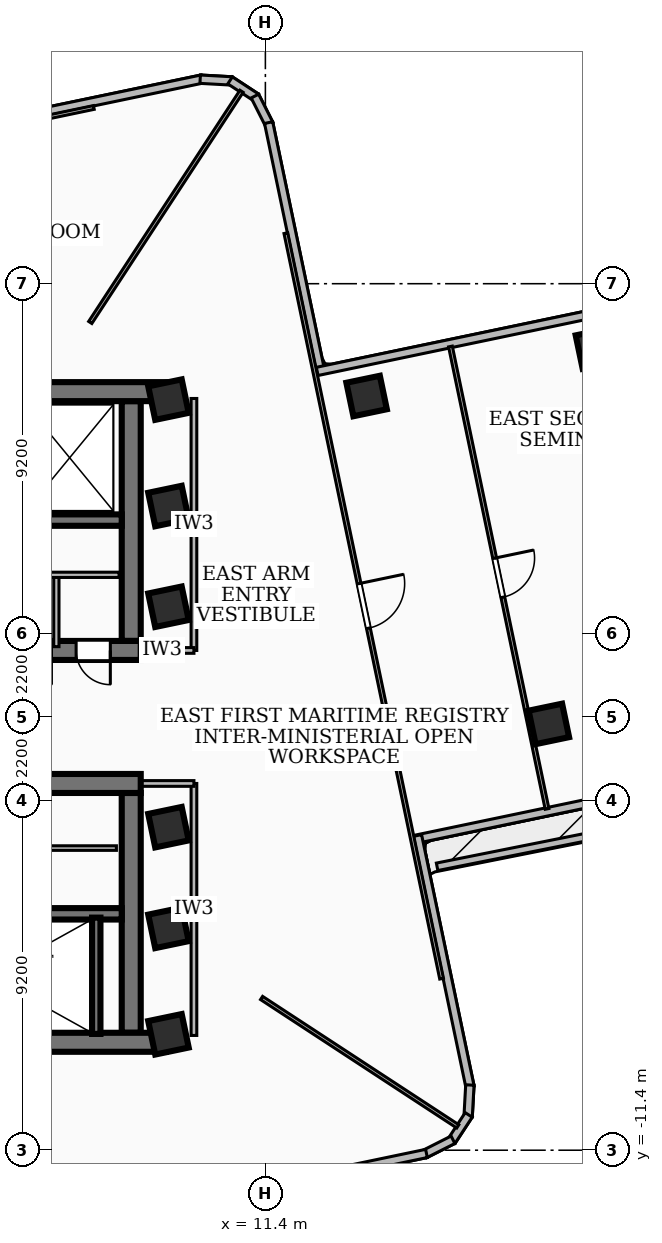
"""IFC4 building model, lengths in metres.
Left out: names, types, materials, properties, quantities, classifications, styles, units other than length and angle.
Written with IfcOpenShell. Run it as: python <this file> out.ifc"""

import sys

from ifc_helpers import new_model, si_unit, direction, frame, frame_2d, origin, origin_2d, place, context, subcontext, project, spatial, rectangle, extrude, element, fill, save


model = new_model("IFC4")
c1 = context("Model", 3, precision=1e-05, world=origin(), true_north=direction((0.0, 1.0)))
c2 = subcontext(c1, "Body", "Model", "MODEL_VIEW")
j1 = project(units=[si_unit("LENGTHUNIT", "METRE"), si_unit("PLANEANGLEUNIT", "RADIAN")], contexts=[c1])
p1 = place(None, origin())
s1 = spatial("IfcSite", under=j1, at=p1, CompositionType="ELEMENT")
p2 = place(p1, origin())
s2 = spatial("IfcBuilding", under=s1, at=p2, CompositionType="ELEMENT")
p3 = place(p2, frame((0.0, 0.0, 111.96)))
s3 = spatial("IfcBuildingStorey", under=s2, at=p3, CompositionType="ELEMENT", Elevation=111.96)
p4 = place(p3, frame((-8.78, 8.56, 0.0), z_axis=(0.0, 0.0, 1.0), x_axis=(1.0, 0.0, 0.0)))
e1 = element("IfcWall", 1, at=p4, inside=s3, PredefinedType="SHEAR", context=c2, shape_type="SweptSolid", body=[
    extrude(rectangle(XDim=17.56, YDim=0.5, at=frame_2d((8.78, 0.0))), origin(), (0.0, 0.0, 1.0), 4.06),
])
p5 = place(p3, frame((8.12, 1.75, 0.0), z_axis=(0.0, 0.0, 1.0), x_axis=(-1.0, 0.0, 0.0)))
e2 = element("IfcWall", 2, at=p5, inside=s3, PredefinedType="SHEAR", context=c2, shape_type="SweptSolid", body=[
    extrude(rectangle(XDim=16.24, YDim=0.5, at=frame_2d((8.12, 0.0))), origin(), (0.0, 0.0, 1.0), 4.06),
])
p6 = place(p5, frame((7.45, 0.0, 0.0)))
e3 = element("IfcOpeningElement", 3, at=p6, cuts=e2, PredefinedType="OPENING", context=c2, shape_type="SweptSolid", body=[
    extrude(rectangle(XDim=1.0, YDim=2.1, at=frame_2d((0.5, 1.05))), frame((0.0, 0.26, 0.0), z_axis=(0.0, -1.0, 0.0), x_axis=(1.0, 0.0, 0.0)), (0.0, 0.0, 1.0), 0.52),
])
p7 = place(p5, frame((14.285, 0.0, 0.0)))
e4 = element("IfcOpeningElement", 4, at=p7, cuts=e2, PredefinedType="OPENING", context=c2, shape_type="SweptSolid", body=[
    extrude(rectangle(XDim=1.05, YDim=2.15, at=frame_2d((0.525, 1.075))), frame((0.0, 0.26, 0.0), z_axis=(0.0, -1.0, 0.0), x_axis=(1.0, 0.0, 0.0)), (0.0, 0.0, 1.0), 0.52),
])
p8 = place(p5, frame((12.725, 0.0, 0.0)))
e5 = element("IfcOpeningElement", 5, at=p8, cuts=e2, PredefinedType="OPENING", context=c2, shape_type="SweptSolid", body=[
    extrude(rectangle(XDim=1.05, YDim=2.15, at=frame_2d((0.525, 1.075))), frame((0.0, 0.26, 0.0), z_axis=(0.0, -1.0, 0.0), x_axis=(1.0, 0.0, 0.0)), (0.0, 0.0, 1.0), 0.52),
])
p9 = place(p5, frame((11.165, 0.0, 0.0)))
e6 = element("IfcOpeningElement", 6, at=p9, cuts=e2, PredefinedType="OPENING", context=c2, shape_type="SweptSolid", body=[
    extrude(rectangle(XDim=1.05, YDim=2.15, at=frame_2d((0.525, 1.075))), frame((0.0, 0.26, 0.0), z_axis=(0.0, -1.0, 0.0), x_axis=(1.0, 0.0, 0.0)), (0.0, 0.0, 1.0), 0.52),
])
p10 = place(p5, frame((3.85, 0.0, 0.0)))
e7 = element("IfcOpeningElement", 7, at=p10, cuts=e2, PredefinedType="OPENING", context=c2, shape_type="SweptSolid", body=[
    extrude(rectangle(XDim=0.9, YDim=2.06, at=frame_2d((0.45, 1.03))), frame((0.0, 0.26, 0.0), z_axis=(0.0, -1.0, 0.0), x_axis=(1.0, 0.0, 0.0)), (0.0, 0.0, 1.0), 0.52),
])
p11 = place(p5, frame((2.35, 0.0, 0.0)))
e8 = element("IfcOpeningElement", 8, at=p11, cuts=e2, PredefinedType="OPENING", context=c2, shape_type="SweptSolid", body=[
    extrude(rectangle(XDim=0.9, YDim=2.06, at=frame_2d((0.45, 1.03))), frame((0.0, 0.26, 0.0), z_axis=(0.0, -1.0, 0.0), x_axis=(1.0, 0.0, 0.0)), (0.0, 0.0, 1.0), 0.52),
])
p12 = place(p5, frame((0.8, 0.0, 0.0)))
e9 = element("IfcOpeningElement", 9, at=p12, cuts=e2, PredefinedType="OPENING", context=c2, shape_type="SweptSolid", body=[
    extrude(rectangle(XDim=0.9, YDim=2.06, at=frame_2d((0.45, 1.03))), frame((0.0, 0.26, 0.0), z_axis=(0.0, -1.0, 0.0), x_axis=(1.0, 0.0, 0.0)), (0.0, 0.0, 1.0), 0.52),
])
p13 = place(p3, frame((7.87, 8.31, 0.0), z_axis=(0.0, 0.0, 1.0), x_axis=(0.0, -1.0, 0.0)))
e10 = element("IfcWall", 10, at=p13, inside=s3, PredefinedType="SHEAR", context=c2, shape_type="SweptSolid", body=[
    extrude(rectangle(XDim=6.31, YDim=0.5, at=frame_2d((3.155, 0.0))), origin(), (0.0, 0.0, 1.0), 4.06),
])
p14 = place(p3, frame((7.62, 5.18, 0.0), z_axis=(0.0, 0.0, 1.0), x_axis=(-1.0, 0.0, 0.0)))
e11 = element("IfcWall", 11, at=p14, inside=s3, PredefinedType="SOLIDWALL", context=c2, shape_type="SweptSolid", body=[
    extrude(rectangle(XDim=15.24, YDim=0.3, at=frame_2d((7.62, 0.0))), origin(), (0.0, 0.0, 1.0), 4.06),
])
p15 = place(p14, frame((5.77, 0.0, 0.0)))
e12 = element("IfcOpeningElement", 12, at=p15, cuts=e11, PredefinedType="OPENING", context=c2, shape_type="SweptSolid", body=[
    extrude(rectangle(XDim=1.1, YDim=2.15, at=frame_2d((0.55, 1.075))), frame((0.0, 0.16, 0.0), z_axis=(0.0, -1.0, 0.0), x_axis=(1.0, 0.0, 0.0)), (0.0, 0.0, 1.0), 0.32),
])
p16 = place(p14, frame((2.97, 0.0, 0.0)))
e13 = element("IfcOpeningElement", 13, at=p16, cuts=e11, PredefinedType="OPENING", context=c2, shape_type="SweptSolid", body=[
    extrude(rectangle(XDim=1.1, YDim=2.15, at=frame_2d((0.55, 1.075))), frame((0.0, 0.16, 0.0), z_axis=(0.0, -1.0, 0.0), x_axis=(1.0, 0.0, 0.0)), (0.0, 0.0, 1.0), 0.32),
])
p17 = place(p14, frame((7.97, 0.0, 0.0)))
e14 = element("IfcOpeningElement", 14, at=p17, cuts=e11, PredefinedType="OPENING", context=c2, shape_type="SweptSolid", body=[
    extrude(rectangle(XDim=1.0, YDim=2.1, at=frame_2d((0.5, 1.05))), frame((0.0, 0.16, 0.0), z_axis=(0.0, -1.0, 0.0), x_axis=(1.0, 0.0, 0.0)), (0.0, 0.0, 1.0), 0.32),
])
p18 = place(p3, frame((8.78, -8.56, 0.0), z_axis=(0.0, 0.0, 1.0), x_axis=(-1.0, 0.0, 0.0)))
e15 = element("IfcWall", 15, at=p18, inside=s3, PredefinedType="SHEAR", context=c2, shape_type="SweptSolid", body=[
    extrude(rectangle(XDim=17.56, YDim=0.5, at=frame_2d((8.78, 0.0))), origin(), (0.0, 0.0, 1.0), 4.06),
])
p19 = place(p3, frame((-8.12, -1.75, 0.0), z_axis=(0.0, 0.0, 1.0), x_axis=(1.0, 0.0, 0.0)))
e16 = element("IfcWall", 16, at=p19, inside=s3, PredefinedType="SHEAR", context=c2, shape_type="SweptSolid", body=[
    extrude(rectangle(XDim=16.24, YDim=0.5, at=frame_2d((8.12, 0.0))), origin(), (0.0, 0.0, 1.0), 4.06),
])
p20 = place(p19, frame((7.45, 0.0, 0.0)))
e17 = element("IfcOpeningElement", 17, at=p20, cuts=e16, PredefinedType="OPENING", context=c2, shape_type="SweptSolid", body=[
    extrude(rectangle(XDim=1.0, YDim=2.1, at=frame_2d((0.5, 1.05))), frame((0.0, 0.26, 0.0), z_axis=(0.0, -1.0, 0.0), x_axis=(1.0, 0.0, 0.0)), (0.0, 0.0, 1.0), 0.52),
])
p21 = place(p19, frame((12.65, 0.0, 0.0)))
e18 = element("IfcOpeningElement", 18, at=p21, cuts=e16, PredefinedType="OPENING", context=c2, shape_type="SweptSolid", body=[
    extrude(rectangle(XDim=0.9, YDim=2.06, at=frame_2d((0.45, 1.03))), frame((0.0, 0.26, 0.0), z_axis=(0.0, -1.0, 0.0), x_axis=(1.0, 0.0, 0.0)), (0.0, 0.0, 1.0), 0.52),
])
p22 = place(p19, frame((0.565, 0.0, 0.0)))
e19 = element("IfcOpeningElement", 19, at=p22, cuts=e16, PredefinedType="OPENING", context=c2, shape_type="SweptSolid", body=[
    extrude(rectangle(XDim=1.05, YDim=2.15, at=frame_2d((0.525, 1.075))), frame((0.0, 0.26, 0.0), z_axis=(0.0, -1.0, 0.0), x_axis=(1.0, 0.0, 0.0)), (0.0, 0.0, 1.0), 0.52),
])
p23 = place(p19, frame((2.125, 0.0, 0.0)))
e20 = element("IfcOpeningElement", 20, at=p23, cuts=e16, PredefinedType="OPENING", context=c2, shape_type="SweptSolid", body=[
    extrude(rectangle(XDim=1.05, YDim=2.15, at=frame_2d((0.525, 1.075))), frame((0.0, 0.26, 0.0), z_axis=(0.0, -1.0, 0.0), x_axis=(1.0, 0.0, 0.0)), (0.0, 0.0, 1.0), 0.52),
])
p24 = place(p19, frame((3.685, 0.0, 0.0)))
e21 = element("IfcOpeningElement", 21, at=p24, cuts=e16, PredefinedType="OPENING", context=c2, shape_type="SweptSolid", body=[
    extrude(rectangle(XDim=1.05, YDim=2.15, at=frame_2d((0.525, 1.075))), frame((0.0, 0.26, 0.0), z_axis=(0.0, -1.0, 0.0), x_axis=(1.0, 0.0, 0.0)), (0.0, 0.0, 1.0), 0.52),
])
p25 = place(p3, frame((7.87, -2.0, 0.0), z_axis=(0.0, 0.0, 1.0), x_axis=(0.0, -1.0, 0.0)))
e22 = element("IfcWall", 22, at=p25, inside=s3, PredefinedType="SHEAR", context=c2, shape_type="SweptSolid", body=[
    extrude(rectangle(XDim=6.31, YDim=0.5, at=frame_2d((3.155, 0.0))), origin(), (0.0, 0.0, 1.0), 4.06),
])
p26 = place(p3, frame((-7.62, -5.18, 0.0), z_axis=(0.0, 0.0, 1.0), x_axis=(1.0, 0.0, 0.0)))
e23 = element("IfcWall", 23, at=p26, inside=s3, PredefinedType="SOLIDWALL", context=c2, shape_type="SweptSolid", body=[
    extrude(rectangle(XDim=15.24, YDim=0.3, at=frame_2d((7.62, 0.0))), origin(), (0.0, 0.0, 1.0), 4.06),
])
p27 = place(p26, frame((5.77, 0.0, 0.0)))
e24 = element("IfcOpeningElement", 24, at=p27, cuts=e23, PredefinedType="OPENING", context=c2, shape_type="SweptSolid", body=[
    extrude(rectangle(XDim=1.1, YDim=2.15, at=frame_2d((0.55, 1.075))), frame((0.0, 0.16, 0.0), z_axis=(0.0, -1.0, 0.0), x_axis=(1.0, 0.0, 0.0)), (0.0, 0.0, 1.0), 0.32),
])
p28 = place(p26, frame((7.97, 0.0, 0.0)))
e25 = element("IfcOpeningElement", 25, at=p28, cuts=e23, PredefinedType="OPENING", context=c2, shape_type="SweptSolid", body=[
    extrude(rectangle(XDim=1.0, YDim=2.1, at=frame_2d((0.5, 1.05))), frame((0.0, 0.16, 0.0), z_axis=(0.0, -1.0, 0.0), x_axis=(1.0, 0.0, 0.0)), (0.0, 0.0, 1.0), 0.32),
])
p29 = place(p3, frame((6.95, -8.34, 0.0), z_axis=(0.0, 0.0, 1.0), x_axis=(0.0, 1.0, 0.0)))
e26 = element("IfcWall", 26, at=p29, inside=s3, PredefinedType="SOLIDWALL", context=c2, shape_type="SweptSolid", body=[
    extrude(rectangle(XDim=3.06, YDim=0.22, at=frame_2d((1.53, 0.0))), origin(), (0.0, 0.0, 1.0), 4.06),
])
for number, where, z_axis, x_axis in (
    (27, (8.85, -5.55, 0.0), (0.0, 0.0, 1.0), (0.979, 0.204, 0.0)),
    (28, (8.85, -2.9, 0.0), (0.0, 0.0, 1.0), (0.979, 0.204, 0.0)),
    (29, (8.85, 2.9, 0.0), (0.0, 0.0, 1.0), (0.979, 0.204, 0.0)),
    (30, (8.85, 5.55, 0.0), (0.0, 0.0, 1.0), (0.979, 0.204, 0.0)),
    (31, (8.85, -8.35, 0.0), (0.0, 0.0, 1.0), (0.979, 0.204, 0.0)),
    (32, (8.85, 8.35, 0.0), (0.0, 0.0, 1.0), (0.979, 0.204, 0.0)),
    (33, (18.86, -0.183, 0.0), (0.0, 0.0, 1.0), (0.979, 0.204, 0.0)),
    (34, (14.064, 8.445, 0.0), (0.0, 0.0, 1.0), (0.979, 0.204, 0.0)),
    (35, (20.098, 9.692, 0.0), (0.0, 0.0, 1.0), (0.979, 0.204, 0.0)),
):
    element("IfcColumn", number, at=place(p3, frame(where, z_axis=z_axis, x_axis=x_axis)), inside=s3, PredefinedType="COLUMN", context=c2, shape_type="SweptSolid", body=[
        extrude(rectangle(XDim=0.9, YDim=0.9, at=origin_2d()), origin(), (0.0, 0.0, 1.0), 4.32),
    ])
p30 = place(p3, frame((3.119, 15.403, 0.0), z_axis=(0.0, 0.0, 1.0), x_axis=(0.978864530031, 0.204509735336, 0.0)))
e36 = element("IfcWall", 36, at=p30, inside=s3, PredefinedType="SOLIDWALL", context=c2, shape_type="SweptSolid", body=[
    extrude(rectangle(XDim=6.757, YDim=0.22, at=frame_2d((3.378, 0.0))), origin(), (0.0, 0.0, 1.0), 3.29),
])
p31 = place(p3, frame((9.684, 16.781, 0.0), z_axis=(0.0, 0.0, 1.0), x_axis=(0.998485462078, -0.055016197793, 0.0)))
e37 = element("IfcWall", 37, at=p31, inside=s3, PredefinedType="SOLIDWALL", context=c2, shape_type="SweptSolid", body=[
    extrude(rectangle(XDim=0.834, YDim=0.22, at=frame_2d((0.417, 0.0))), origin(), (0.0, 0.0, 1.0), 4.06),
])
p32 = place(p3, frame((10.471, 16.75, 0.0), z_axis=(0.0, 0.0, 1.0), x_axis=(0.836738727822, -0.54760232045, 0.0)))
e38 = element("IfcWall", 38, at=p32, inside=s3, PredefinedType="SOLIDWALL", context=c2, shape_type="SweptSolid", body=[
    extrude(rectangle(XDim=0.82, YDim=0.22, at=frame_2d((0.41, 0.0))), origin(), (0.0, 0.0, 1.0), 4.06),
])
p33 = place(p3, frame((11.125, 16.337, 0.0), z_axis=(0.0, 0.0, 1.0), x_axis=(0.45107578101, -0.892485652426, 0.0)))
e39 = element("IfcWall", 39, at=p33, inside=s3, PredefinedType="SOLIDWALL", context=c2, shape_type="SweptSolid", body=[
    extrude(rectangle(XDim=0.833, YDim=0.22, at=frame_2d((0.417, 0.0))), origin(), (0.0, 0.0, 1.0), 4.06),
])
p34 = place(p3, frame((11.485, 15.639, 0.0), z_axis=(0.0, 0.0, 1.0), x_axis=(0.204480806295, -0.978870573598, 0.0)))
e40 = element("IfcWall", 40, at=p34, inside=s3, PredefinedType="SOLIDWALL", context=c2, shape_type="SweptSolid", body=[
    extrude(rectangle(XDim=6.758, YDim=0.22, at=frame_2d((3.379, 0.0))), origin(), (0.0, 0.0, 1.0), 4.06),
])
p35 = place(p3, frame((12.763, 9.092, 0.0), z_axis=(0.0, 0.0, 1.0), x_axis=(0.97886813171, 0.204492495517, 0.0)))
e41 = element("IfcWall", 41, at=p35, inside=s3, PredefinedType="SOLIDWALL", context=c2, shape_type="SweptSolid", body=[
    extrude(rectangle(XDim=13.458, YDim=0.22, at=frame_2d((6.729, 0.0))), origin(), (0.0, 0.0, 1.0), 4.06),
])
p36 = place(p35, frame((10.257, 0.0, 0.85)))
e42 = element("IfcOpeningElement", 42, at=p36, cuts=e41, PredefinedType="OPENING", context=c2, shape_type="SweptSolid", body=[
    extrude(rectangle(XDim=2.1, YDim=1.6, at=frame_2d((1.05, 0.8))), frame((0.0, 0.12, 0.0), z_axis=(0.0, -1.0, 0.0), x_axis=(1.0, 0.0, 0.0)), (0.0, 0.0, 1.0), 0.24),
])
p37 = place(p3, frame((28.509, -0.47, 0.0), z_axis=(0.0, 0.0, 1.0), x_axis=(-0.97885663995, -0.204547496749, 0.0)))
e43 = element("IfcWall", 43, at=p37, inside=s3, PredefinedType="SOLIDWALL", context=c2, shape_type="SweptSolid", body=[
    extrude(rectangle(XDim=13.459, YDim=0.22, at=frame_2d((6.729, 0.0))), origin(), (0.0, 0.0, 1.0), 4.06),
])
p38 = place(p37, frame((4.35, 0.0, 0.85)))
e44 = element("IfcOpeningElement", 44, at=p38, cuts=e43, PredefinedType="OPENING", context=c2, shape_type="SweptSolid", body=[
    extrude(rectangle(XDim=2.7, YDim=1.85, at=frame_2d((1.35, 0.925))), frame((0.0, 0.12, 0.0), z_axis=(0.0, -1.0, 0.0), x_axis=(1.0, 0.0, 0.0)), (0.0, 0.0, 1.0), 0.24),
])
p39 = place(p3, frame((15.403, -3.119, 0.0), z_axis=(0.0, 0.0, 1.0), x_axis=(0.204509735336, -0.978864530031, 0.0)))
e45 = element("IfcWall", 45, at=p39, inside=s3, PredefinedType="SOLIDWALL", context=c2, shape_type="SweptSolid", body=[
    extrude(rectangle(XDim=6.757, YDim=0.22, at=frame_2d((3.378, 0.0))), origin(), (0.0, 0.0, 1.0), 4.06),
])
p40 = place(p3, frame((16.781, -9.684, 0.0), z_axis=(0.0, 0.0, 1.0), x_axis=(-0.055016197793, -0.998485462078, 0.0)))
e46 = element("IfcWall", 46, at=p40, inside=s3, PredefinedType="SOLIDWALL", context=c2, shape_type="SweptSolid", body=[
    extrude(rectangle(XDim=0.834, YDim=0.22, at=frame_2d((0.417, 0.0))), origin(), (0.0, 0.0, 1.0), 4.06),
])
p41 = place(p3, frame((16.75, -10.471, 0.0), z_axis=(0.0, 0.0, 1.0), x_axis=(-0.54760232045, -0.836738727822, 0.0)))
e47 = element("IfcWall", 47, at=p41, inside=s3, PredefinedType="SOLIDWALL", context=c2, shape_type="SweptSolid", body=[
    extrude(rectangle(XDim=0.82, YDim=0.22, at=frame_2d((0.41, 0.0))), origin(), (0.0, 0.0, 1.0), 4.06),
])
p42 = place(p3, frame((16.337, -11.125, 0.0), z_axis=(0.0, 0.0, 1.0), x_axis=(-0.892485652426, -0.45107578101, 0.0)))
e48 = element("IfcWall", 48, at=p42, inside=s3, PredefinedType="SOLIDWALL", context=c2, shape_type="SweptSolid", body=[
    extrude(rectangle(XDim=0.833, YDim=0.22, at=frame_2d((0.417, 0.0))), origin(), (0.0, 0.0, 1.0), 4.06),
])
p43 = place(p3, frame((15.639, -11.485, 0.0), z_axis=(0.0, 0.0, 1.0), x_axis=(-0.978870573598, -0.204480806295, 0.0)))
e49 = element("IfcWall", 49, at=p43, inside=s3, PredefinedType="SOLIDWALL", context=c2, shape_type="SweptSolid", body=[
    extrude(rectangle(XDim=6.758, YDim=0.22, at=frame_2d((3.379, 0.0))), origin(), (0.0, 0.0, 1.0), 4.06),
])
p44 = place(p3, frame((15.919, -3.943, 0.0), z_axis=(0.0, 0.0, 1.0), x_axis=(0.980669803086, 0.195669970395, 0.0)))
e50 = element("IfcWall", 50, at=p44, inside=s3, PredefinedType="PARAPET", context=c2, shape_type="SweptSolid", body=[
    extrude(rectangle(XDim=15.68, YDim=0.2, at=frame_2d((7.84, 0.0))), origin(), (0.0, 0.0, 1.0), 0.88),
])
p45 = place(p3, frame((2.9, 3.74, 0.0), z_axis=(0.0, 0.0, 1.0), x_axis=(1.0, 0.0, 0.0)))
e51 = element("IfcWall", 51, at=p45, inside=s3, PredefinedType="PARTITIONING", context=c2, shape_type="SweptSolid", body=[
    extrude(rectangle(XDim=4.65, YDim=0.138, at=frame_2d((2.325, 0.0))), origin(), (0.0, 0.0, 1.0), 4.06),
])
p46 = place(p3, frame((2.8, -3.45, 0.0), z_axis=(0.0, 0.0, 1.0), x_axis=(1.0, 0.0, 0.0)))
e52 = element("IfcWall", 52, at=p46, inside=s3, PredefinedType="PARTITIONING", context=c2, shape_type="SweptSolid", body=[
    extrude(rectangle(XDim=4.68, YDim=0.12, at=frame_2d((2.34, 0.0))), origin(), (0.0, 0.0, 1.0), 4.06),
])
p47 = place(p46, frame((1.9, 0.0, 0.0)))
e53 = element("IfcOpeningElement", 53, at=p47, cuts=e52, PredefinedType="OPENING", context=c2, shape_type="SweptSolid", body=[
    extrude(rectangle(XDim=0.86, YDim=2.04, at=frame_2d((0.43, 1.02))), frame((0.0, 0.07, 0.0), z_axis=(0.0, -1.0, 0.0), x_axis=(1.0, 0.0, 0.0)), (0.0, 0.0, 1.0), 0.14),
])
p48 = place(p3, frame((5.9, 1.85, 0.0), z_axis=(0.0, 0.0, 1.0), x_axis=(0.0, 1.0, 0.0)))
e54 = element("IfcWall", 54, at=p48, inside=s3, PredefinedType="PARTITIONING", context=c2, shape_type="SweptSolid", body=[
    extrude(rectangle(XDim=1.89, YDim=0.138, at=frame_2d((0.945, 0.0))), origin(), (0.0, 0.0, 1.0), 3.29),
])
p49 = place(p3, frame((9.52, 1.75, 0.0), z_axis=(0.0, 0.0, 1.0), x_axis=(0.0, 1.0, 0.0)))
e55 = element("IfcWall", 55, at=p49, inside=s3, PredefinedType="PARTITIONING", context=c2, shape_type="SweptSolid", body=[
    extrude(rectangle(XDim=6.63, YDim=0.15, at=frame_2d((3.315, 0.0))), origin(), (0.0, 0.0, 1.0), 3.29),
])
p50 = place(p3, frame((7.85, 1.75, 0.0), z_axis=(0.0, 0.0, 1.0), x_axis=(1.0, 0.0, 0.0)))
e56 = element("IfcWall", 56, at=p50, inside=s3, PredefinedType="PARTITIONING", context=c2, shape_type="SweptSolid", body=[
    extrude(rectangle(XDim=1.67, YDim=0.15, at=frame_2d((0.835, 0.0))), origin(), (0.0, 0.0, 1.0), 3.29),
])
p51 = place(p3, frame((9.52, -8.38, 0.0), z_axis=(0.0, 0.0, 1.0), x_axis=(0.0, 1.0, 0.0)))
e57 = element("IfcWall", 57, at=p51, inside=s3, PredefinedType="PARTITIONING", context=c2, shape_type="SweptSolid", body=[
    extrude(rectangle(XDim=6.63, YDim=0.15, at=frame_2d((3.315, 0.0))), origin(), (0.0, 0.0, 1.0), 3.29),
])
p52 = place(p3, frame((7.85, -1.75, 0.0), z_axis=(0.0, 0.0, 1.0), x_axis=(1.0, 0.0, 0.0)))
e58 = element("IfcWall", 58, at=p52, inside=s3, PredefinedType="PARTITIONING", context=c2, shape_type="SweptSolid", body=[
    extrude(rectangle(XDim=1.67, YDim=0.15, at=frame_2d((0.835, 0.0))), origin(), (0.0, 0.0, 1.0), 3.29),
])
p53 = place(p3, frame((6.792, 10.38, 0.0), z_axis=(0.0, 0.0, 1.0), x_axis=(0.547596764532, 0.836742363858, 0.0)))
e59 = element("IfcWall", 59, at=p53, inside=s3, PredefinedType="PARTITIONING", context=c2, shape_type="SweptSolid", body=[
    extrude(rectangle(XDim=7.27, YDim=0.1, at=frame_2d((3.635, 0.0))), origin(), (0.0, 0.0, 1.0), 3.29),
])
p54 = place(p3, frame((11.3, -7.394, 0.0), z_axis=(0.0, 0.0, 1.0), x_axis=(0.836731843599, -0.547612839429, 0.0)))
e60 = element("IfcWall", 60, at=p54, inside=s3, PredefinedType="PARTITIONING", context=c2, shape_type="SweptSolid", body=[
    extrude(rectangle(XDim=6.17, YDim=0.1, at=frame_2d((3.085, 0.0))), origin(), (0.0, 0.0, 1.0), 4.06),
])
p55 = place(p3, frame((11.939, 12.73, 0.0), z_axis=(0.0, 0.0, 1.0), x_axis=(0.204503489908, -0.978865834839, 0.0)))
e61 = element("IfcWall", 61, at=p55, inside=s3, PredefinedType="PARTITIONING", context=c2, shape_type="SweptSolid", body=[
    extrude(rectangle(XDim=20.04, YDim=0.1, at=frame_2d((10.02, 0.0))), origin(), (0.0, 0.0, 1.0), 3.29),
])
p56 = place(p55, frame((9.42, 0.0, 0.0)))
e62 = element("IfcOpeningElement", 62, at=p56, cuts=e61, PredefinedType="OPENING", context=c2, shape_type="SweptSolid", body=[
    extrude(rectangle(XDim=1.2, YDim=2.1, at=frame_2d((0.6, 1.05))), frame((0.0, 0.06, 0.0), z_axis=(0.0, -1.0, 0.0), x_axis=(1.0, 0.0, 0.0)), (0.0, 0.0, 1.0), 0.12),
])
p57 = place(p3, frame((16.27, 9.748, 0.0), z_axis=(0.0, 0.0, 1.0), x_axis=(0.204509549155, -0.978864568929, 0.0)))
e63 = element("IfcWall", 63, at=p57, inside=s3, PredefinedType="PARTITIONING", context=c2, shape_type="SweptSolid", body=[
    extrude(rectangle(XDim=12.43, YDim=0.1, at=frame_2d((6.215, 0.0))), origin(), (0.0, 0.0, 1.0), 3.29),
])
p58 = place(p57, frame((5.69, 0.0, 0.0)))
e64 = element("IfcOpeningElement", 64, at=p58, cuts=e63, PredefinedType="OPENING", context=c2, shape_type="SweptSolid", body=[
    extrude(rectangle(XDim=1.05, YDim=2.08, at=frame_2d((0.525, 1.04))), frame((0.0, 0.06, 0.0), z_axis=(0.0, -1.0, 0.0), x_axis=(1.0, 0.0, 0.0)), (0.0, 0.0, 1.0), 0.12),
])
p59 = place(p3, frame((-12.73, 11.939, 0.0), z_axis=(0.0, 0.0, 1.0), x_axis=(0.978865834839, 0.204503489908, 0.0)))
e65 = element("IfcWall", 65, at=p59, inside=s3, PredefinedType="PARTITIONING", context=c2, shape_type="SweptSolid", body=[
    extrude(rectangle(XDim=20.04, YDim=0.1, at=frame_2d((10.02, 0.0))), origin(), (0.0, 0.0, 1.0), 3.29),
])
p60 = place(p59, frame((9.42, 0.0, 0.0)))
e66 = element("IfcOpeningElement", 66, at=p60, cuts=e65, PredefinedType="OPENING", context=c2, shape_type="SweptSolid", body=[
    extrude(rectangle(XDim=1.2, YDim=2.1, at=frame_2d((0.6, 1.05))), frame((0.0, 0.06, 0.0), z_axis=(0.0, -1.0, 0.0), x_axis=(1.0, 0.0, 0.0)), (0.0, 0.0, 1.0), 0.12),
])
p61 = place(p12, origin())
e67 = element("IfcDoor", 67, at=p61, inside=s3, OperationType="SINGLE_SWING_LEFT", PredefinedType="DOOR", context=c2, shape_type="SweptSolid", body=[
    extrude(rectangle(XDim=0.9, YDim=2.06, at=frame_2d((0.45, 1.03))), frame((0.0, 0.025, 0.0), z_axis=(0.0, -1.0, 0.0), x_axis=(1.0, 0.0, 0.0)), (0.0, 0.0, 1.0), 0.05),
])
fill(e9, e67)
p62 = place(p56, origin())
e68 = element("IfcDoor", 68, at=p62, inside=s3, OperationType="SINGLE_SWING_LEFT", PredefinedType="DOOR", context=c2, shape_type="SweptSolid", body=[
    extrude(rectangle(XDim=1.2, YDim=2.1, at=frame_2d((0.6, 1.05))), frame((0.0, 0.025, 0.0), z_axis=(0.0, -1.0, 0.0), x_axis=(1.0, 0.0, 0.0)), (0.0, 0.0, 1.0), 0.05),
])
fill(e62, e68)
p63 = place(p58, origin())
e69 = element("IfcDoor", 69, at=p63, inside=s3, OperationType="SINGLE_SWING_LEFT", PredefinedType="DOOR", context=c2, shape_type="SweptSolid", body=[
    extrude(rectangle(XDim=1.05, YDim=2.08, at=frame_2d((0.525, 1.04))), frame((0.0, 0.025, 0.0), z_axis=(0.0, -1.0, 0.0), x_axis=(1.0, 0.0, 0.0)), (0.0, 0.0, 1.0), 0.05),
])
fill(e64, e69)
save(model, sys.argv[1])
